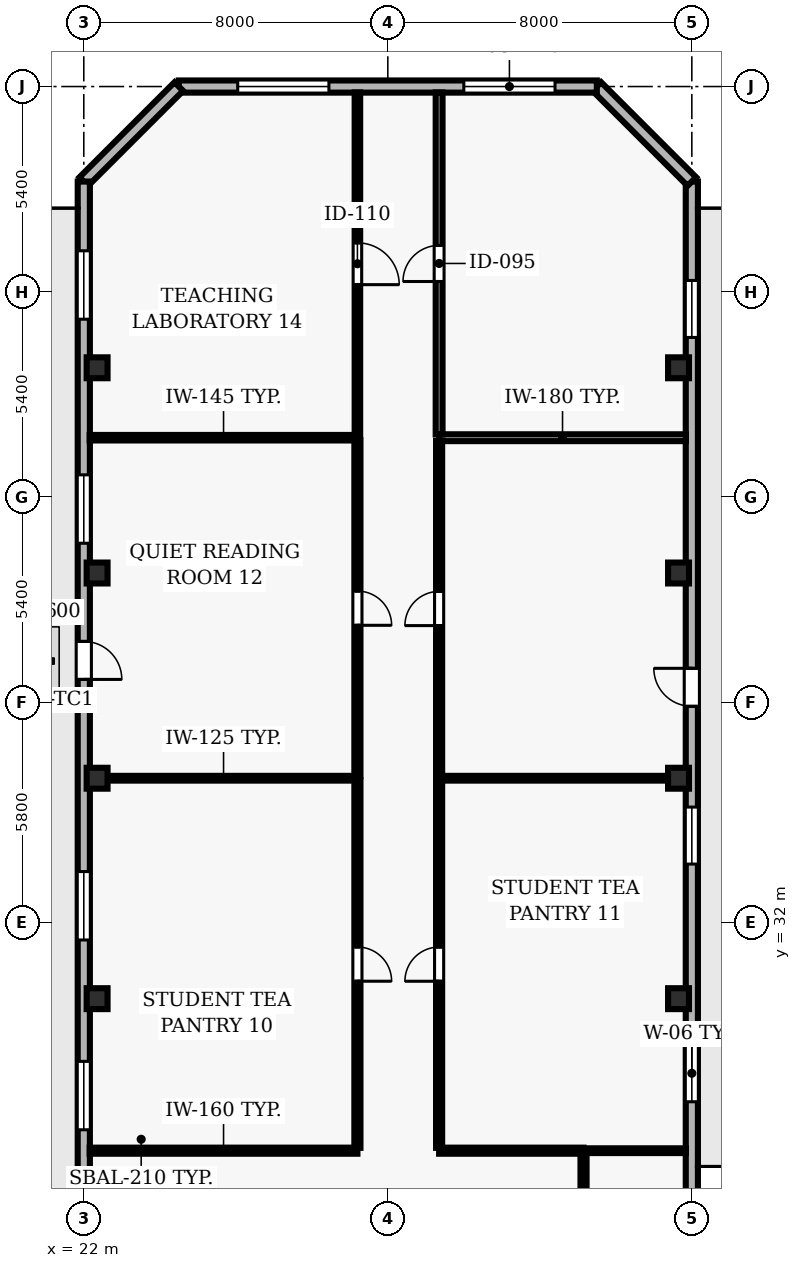
"""IFC4 building model, lengths in metres.
Left out: names, types, materials, properties, quantities, classifications, styles, units other than length and angle.
Written with IfcOpenShell. Run it as: python <this file> out.ifc"""

import sys

from ifc_helpers import new_model, si_unit, direction, frame, frame_2d, origin, origin_2d, place, context, subcontext, project, spatial, rectangle, hollow_rectangle, extrude, element, fill, save


model = new_model("IFC4")
c1 = context("Model", 3, precision=1e-05, world=origin(), true_north=direction((0.0, 1.0)))
c2 = subcontext(c1, "Body", "Model", "MODEL_VIEW")
j1 = project(units=[si_unit("LENGTHUNIT", "METRE"), si_unit("PLANEANGLEUNIT", "RADIAN")], contexts=[c1])
p1 = place(None, origin())
s1 = spatial("IfcSite", under=j1, at=p1, CompositionType="ELEMENT")
p2 = place(p1, origin())
s2 = spatial("IfcBuilding", under=s1, at=p2, CompositionType="ELEMENT")
p3 = place(p2, frame((0.0, 0.0, 89.5)))
s3 = spatial("IfcBuildingStorey", under=s2, at=p3, CompositionType="ELEMENT", Elevation=89.5)
for number, where, z_axis, x_axis in (
    (1, (22.35, 30.0, 0.0), (0.0, 0.0, 1.0), (1.0, 0.0, 0.0)),
    (2, (37.65, 30.0, 0.0), (0.0, 0.0, 1.0), (1.0, 0.0, 0.0)),
    (3, (22.35, 35.8, 0.0), (0.0, 0.0, 1.0), (1.0, 0.0, 0.0)),
    (4, (37.65, 35.8, 0.0), (0.0, 0.0, 1.0), (1.0, 0.0, 0.0)),
    (5, (22.35, 41.2, 0.0), (0.0, 0.0, 1.0), (1.0, 0.0, 0.0)),
    (6, (37.65, 41.2, 0.0), (0.0, 0.0, 1.0), (1.0, 0.0, 0.0)),
    (7, (22.35, 46.6, 0.0), (0.0, 0.0, 1.0), (1.0, 0.0, 0.0)),
    (8, (37.65, 46.6, 0.0), (0.0, 0.0, 1.0), (1.0, 0.0, 0.0)),
):
    element("IfcColumn", number, at=place(p3, frame(where, z_axis=z_axis, x_axis=x_axis)), inside=s3, PredefinedType="COLUMN", context=c2, shape_type="SweptSolid", body=[
        extrude(hollow_rectangle(XDim=0.55, YDim=0.55, WallThickness=0.025, at=origin_2d()), origin(), (0.0, 0.0, 1.0), 3.9),
    ])
p4 = place(p3, frame((38.0, 24.685, 0.0), z_axis=(0.0, 0.0, 1.0), x_axis=(0.0, 1.0, 0.0)))
e9 = element("IfcWall", 9, at=p4, inside=s3, PredefinedType="SOLIDWALL", context=c2, shape_type="SweptSolid", body=[
    extrude(rectangle(XDim=26.815, YDim=0.32, at=frame_2d((13.407, 0.0))), origin(), (0.0, 0.0, 1.0), 3.64),
])
p5 = place(p4, frame((13.007, 0.0, 0.0)))
e10 = element("IfcOpeningElement", 10, at=p5, cuts=e9, PredefinedType="OPENING", context=c2, shape_type="SweptSolid", body=[
    extrude(rectangle(XDim=1.0, YDim=2.2, at=frame_2d((0.5, 1.1))), frame((0.0, 0.17, 0.0), z_axis=(0.0, -1.0, 0.0), x_axis=(1.0, 0.0, 0.0)), (0.0, 0.0, 1.0), 0.34),
])
p6 = place(p4, frame((2.602, 0.0, 0.9)))
e11 = element("IfcOpeningElement", 11, at=p6, cuts=e9, PredefinedType="OPENING", context=c2, shape_type="SweptSolid", body=[
    extrude(rectangle(XDim=1.5, YDim=1.8, at=frame_2d((0.75, 0.9))), frame((0.0, 0.17, 0.0), z_axis=(0.0, -1.0, 0.0), x_axis=(1.0, 0.0, 0.0)), (0.0, 0.0, 1.0), 0.34),
])
p7 = place(p4, frame((8.856, 0.0, 0.9)))
e12 = element("IfcOpeningElement", 12, at=p7, cuts=e9, PredefinedType="OPENING", context=c2, shape_type="SweptSolid", body=[
    extrude(rectangle(XDim=1.5, YDim=1.8, at=frame_2d((0.75, 0.9))), frame((0.0, 0.17, 0.0), z_axis=(0.0, -1.0, 0.0), x_axis=(1.0, 0.0, 0.0)), (0.0, 0.0, 1.0), 0.34),
])
p8 = place(p4, frame((22.713, 0.0, 0.9)))
e13 = element("IfcOpeningElement", 13, at=p8, cuts=e9, PredefinedType="OPENING", context=c2, shape_type="SweptSolid", body=[
    extrude(rectangle(XDim=1.5, YDim=1.8, at=frame_2d((0.75, 0.9))), frame((0.0, 0.17, 0.0), z_axis=(0.0, -1.0, 0.0), x_axis=(1.0, 0.0, 0.0)), (0.0, 0.0, 1.0), 0.34),
])
p9 = place(p3, frame((38.0, 51.5, 0.0), z_axis=(0.0, 0.0, 1.0), x_axis=(-0.707106781187, 0.707106781187, 0.0)))
e14 = element("IfcWall", 14, at=p9, inside=s3, PredefinedType="SOLIDWALL", context=c2, shape_type="SweptSolid", body=[
    extrude(rectangle(XDim=3.536, YDim=0.32, at=frame_2d((1.768, 0.0))), origin(), (0.0, 0.0, 1.0), 3.64),
])
p10 = place(p3, frame((35.5, 54.0, 0.0), z_axis=(0.0, 0.0, 1.0), x_axis=(-1.0, 0.0, 0.0)))
e15 = element("IfcWall", 15, at=p10, inside=s3, PredefinedType="SOLIDWALL", context=c2, shape_type="SweptSolid", body=[
    extrude(rectangle(XDim=11.0, YDim=0.32, at=frame_2d((5.5, 0.0))), origin(), (0.0, 0.0, 1.0), 3.64),
])
p11 = place(p10, frame((1.1, 0.0, 0.9)))
e16 = element("IfcOpeningElement", 16, at=p11, cuts=e15, PredefinedType="OPENING", context=c2, shape_type="SweptSolid", body=[
    extrude(rectangle(XDim=2.4, YDim=1.8, at=frame_2d((1.2, 0.9))), frame((0.0, 0.17, 0.0), z_axis=(0.0, -1.0, 0.0), x_axis=(1.0, 0.0, 0.0)), (0.0, 0.0, 1.0), 0.34),
])
p12 = place(p10, frame((7.05, 0.0, 0.9)))
e17 = element("IfcOpeningElement", 17, at=p12, cuts=e15, PredefinedType="OPENING", context=c2, shape_type="SweptSolid", body=[
    extrude(rectangle(XDim=2.4, YDim=1.8, at=frame_2d((1.2, 0.9))), frame((0.0, 0.17, 0.0), z_axis=(0.0, -1.0, 0.0), x_axis=(1.0, 0.0, 0.0)), (0.0, 0.0, 1.0), 0.34),
])
p13 = place(p3, frame((24.5, 54.0, 0.0), z_axis=(0.0, 0.0, 1.0), x_axis=(-0.707106781187, -0.707106781187, 0.0)))
e18 = element("IfcWall", 18, at=p13, inside=s3, PredefinedType="SOLIDWALL", context=c2, shape_type="SweptSolid", body=[
    extrude(rectangle(XDim=3.536, YDim=0.32, at=frame_2d((1.768, 0.0))), origin(), (0.0, 0.0, 1.0), 3.64),
])
p14 = place(p3, frame((22.0, 51.5, 0.0), z_axis=(0.0, 0.0, 1.0), x_axis=(0.0, -1.0, 0.0)))
e19 = element("IfcWall", 19, at=p14, inside=s3, PredefinedType="SOLIDWALL", context=c2, shape_type="SweptSolid", body=[
    extrude(rectangle(XDim=49.0, YDim=0.32, at=frame_2d((24.5, 0.0))), origin(), (0.0, 0.0, 1.0), 3.64),
])
p15 = place(p14, frame((12.1, 0.0, 0.0)))
e20 = element("IfcOpeningElement", 20, at=p15, cuts=e19, PredefinedType="OPENING", context=c2, shape_type="SweptSolid", body=[
    extrude(rectangle(XDim=1.0, YDim=2.2, at=frame_2d((0.5, 1.1))), frame((0.0, 0.17, 0.0), z_axis=(0.0, -1.0, 0.0), x_axis=(1.0, 0.0, 0.0)), (0.0, 0.0, 1.0), 0.34),
])
p16 = place(p14, frame((1.822, 0.0, 0.9)))
e21 = element("IfcOpeningElement", 21, at=p16, cuts=e19, PredefinedType="OPENING", context=c2, shape_type="SweptSolid", body=[
    extrude(rectangle(XDim=1.8, YDim=2.2, at=frame_2d((0.9, 1.1))), frame((0.0, 0.17, 0.0), z_axis=(0.0, -1.0, 0.0), x_axis=(1.0, 0.0, 0.0)), (0.0, 0.0, 1.0), 0.34),
])
p17 = place(p14, frame((7.717, 0.0, 0.9)))
e22 = element("IfcOpeningElement", 22, at=p17, cuts=e19, PredefinedType="OPENING", context=c2, shape_type="SweptSolid", body=[
    extrude(rectangle(XDim=1.8, YDim=2.2, at=frame_2d((0.9, 1.1))), frame((0.0, 0.17, 0.0), z_axis=(0.0, -1.0, 0.0), x_axis=(1.0, 0.0, 0.0)), (0.0, 0.0, 1.0), 0.34),
])
p18 = place(p14, frame((18.156, 0.0, 0.9)))
e23 = element("IfcOpeningElement", 23, at=p18, cuts=e19, PredefinedType="OPENING", context=c2, shape_type="SweptSolid", body=[
    extrude(rectangle(XDim=1.8, YDim=2.2, at=frame_2d((0.9, 1.1))), frame((0.0, 0.17, 0.0), z_axis=(0.0, -1.0, 0.0), x_axis=(1.0, 0.0, 0.0)), (0.0, 0.0, 1.0), 0.34),
])
p19 = place(p14, frame((23.15, 0.0, 0.9)))
e24 = element("IfcOpeningElement", 24, at=p19, cuts=e19, PredefinedType="OPENING", context=c2, shape_type="SweptSolid", body=[
    extrude(rectangle(XDim=1.8, YDim=2.2, at=frame_2d((0.9, 1.1))), frame((0.0, 0.17, 0.0), z_axis=(0.0, -1.0, 0.0), x_axis=(1.0, 0.0, 0.0)), (0.0, 0.0, 1.0), 0.34),
])
p20 = place(p14, frame((29.044, 0.0, 0.9)))
e25 = element("IfcOpeningElement", 25, at=p20, cuts=e19, PredefinedType="OPENING", context=c2, shape_type="SweptSolid", body=[
    extrude(rectangle(XDim=1.8, YDim=2.2, at=frame_2d((0.9, 1.1))), frame((0.0, 0.17, 0.0), z_axis=(0.0, -1.0, 0.0), x_axis=(1.0, 0.0, 0.0)), (0.0, 0.0, 1.0), 0.34),
])
p21 = place(p14, frame((34.039, 0.0, 0.9)))
e26 = element("IfcOpeningElement", 26, at=p21, cuts=e19, PredefinedType="OPENING", context=c2, shape_type="SweptSolid", body=[
    extrude(rectangle(XDim=1.8, YDim=2.2, at=frame_2d((0.9, 1.1))), frame((0.0, 0.17, 0.0), z_axis=(0.0, -1.0, 0.0), x_axis=(1.0, 0.0, 0.0)), (0.0, 0.0, 1.0), 0.34),
])
p22 = place(p14, frame((39.933, 0.0, 0.9)))
e27 = element("IfcOpeningElement", 27, at=p22, cuts=e19, PredefinedType="OPENING", context=c2, shape_type="SweptSolid", body=[
    extrude(rectangle(XDim=1.8, YDim=2.2, at=frame_2d((0.9, 1.1))), frame((0.0, 0.17, 0.0), z_axis=(0.0, -1.0, 0.0), x_axis=(1.0, 0.0, 0.0)), (0.0, 0.0, 1.0), 0.34),
])
p23 = place(p3, frame((29.2, 26.0, 0.0), z_axis=(0.0, 0.0, 1.0), x_axis=(-1.0, 0.0, 0.0)))
e28 = element("IfcWall", 28, at=p23, inside=s3, PredefinedType="PARTITIONING", context=c2, shape_type="SweptSolid", body=[
    extrude(rectangle(XDim=7.045, YDim=0.16, at=frame_2d((3.522, 0.0))), origin(), (0.0, 0.0, 1.0), 3.64),
])
p24 = place(p3, frame((29.2, 35.8, 0.0), z_axis=(0.0, 0.0, 1.0), x_axis=(-1.0, 0.0, 0.0)))
e29 = element("IfcWall", 29, at=p24, inside=s3, PredefinedType="PARTITIONING", context=c2, shape_type="SweptSolid", body=[
    extrude(rectangle(XDim=7.045, YDim=0.125, at=frame_2d((3.522, 0.0))), origin(), (0.0, 0.0, 1.0), 3.005),
])
p25 = place(p3, frame((29.2, 44.76, 0.0), z_axis=(0.0, 0.0, 1.0), x_axis=(-1.0, 0.0, 0.0)))
e30 = element("IfcWall", 30, at=p25, inside=s3, PredefinedType="PARTITIONING", context=c2, shape_type="SweptSolid", body=[
    extrude(rectangle(XDim=7.045, YDim=0.145, at=frame_2d((3.522, 0.0))), origin(), (0.0, 0.0, 1.0), 3.64),
])
p26 = place(p3, frame((35.15, 26.0, 0.0), z_axis=(0.0, 0.0, 1.0), x_axis=(-1.0, 0.0, 0.0)))
e31 = element("IfcWall", 31, at=p26, inside=s3, PredefinedType="PARTITIONING", context=c2, shape_type="SweptSolid", body=[
    extrude(rectangle(XDim=3.8, YDim=0.16, at=frame_2d((1.9, 0.0))), origin(), (0.0, 0.0, 1.0), 3.64),
])
p27 = place(p3, frame((35.15, 26.0, 0.0), z_axis=(0.0, 0.0, 1.0), x_axis=(1.0, 0.0, 0.0)))
e32 = element("IfcWall", 32, at=p27, inside=s3, PredefinedType="PARTITIONING", context=c2, shape_type="SweptSolid", body=[
    extrude(rectangle(XDim=2.695, YDim=0.125, at=frame_2d((1.348, 0.0))), origin(), (0.0, 0.0, 1.0), 3.64),
])
p28 = place(p3, frame((37.845, 35.8, 0.0), z_axis=(0.0, 0.0, 1.0), x_axis=(-1.0, 0.0, 0.0)))
e33 = element("IfcWall", 33, at=p28, inside=s3, PredefinedType="PARTITIONING", context=c2, shape_type="SweptSolid", body=[
    extrude(rectangle(XDim=6.495, YDim=0.125, at=frame_2d((3.248, 0.0))), origin(), (0.0, 0.0, 1.0), 3.005),
])
p29 = place(p3, frame((37.845, 44.76, 0.0), z_axis=(0.0, 0.0, 1.0), x_axis=(-1.0, 0.0, 0.0)))
e34 = element("IfcWall", 34, at=p29, inside=s3, PredefinedType="PARTITIONING", context=c2, shape_type="SweptSolid", body=[
    extrude(rectangle(XDim=6.495, YDim=0.18, at=frame_2d((3.248, 0.0))), origin(), (0.0, 0.0, 1.0), 3.64),
])
p30 = place(p3, frame((29.2, 35.742, 0.0), z_axis=(0.0, 0.0, 1.0), x_axis=(0.0, -1.0, 0.0)))
e35 = element("IfcWall", 35, at=p30, inside=s3, PredefinedType="PARTITIONING", context=c2, shape_type="SweptSolid", body=[
    extrude(rectangle(XDim=9.667, YDim=0.16, at=frame_2d((4.833, 0.0))), origin(), (0.0, 0.0, 1.0), 3.64),
])
p31 = place(p30, frame((4.383, 0.0, 0.0)))
e36 = element("IfcOpeningElement", 36, at=p31, cuts=e35, PredefinedType="OPENING", context=c2, shape_type="SweptSolid", body=[
    extrude(rectangle(XDim=0.9, YDim=2.1, at=frame_2d((0.45, 1.05))), frame((0.0, 0.09, 0.0), z_axis=(0.0, -1.0, 0.0), x_axis=(1.0, 0.0, 0.0)), (0.0, 0.0, 1.0), 0.18),
])
p32 = place(p3, frame((29.2, 44.692, 0.0), z_axis=(0.0, 0.0, 1.0), x_axis=(0.0, -1.0, 0.0)))
e37 = element("IfcWall", 37, at=p32, inside=s3, PredefinedType="PARTITIONING", context=c2, shape_type="SweptSolid", body=[
    extrude(rectangle(XDim=8.835, YDim=0.16, at=frame_2d((4.417, 0.0))), origin(), (0.0, 0.0, 1.0), 3.64),
])
p33 = place(p32, frame((3.968, 0.0, 0.0)))
e38 = element("IfcOpeningElement", 38, at=p33, cuts=e37, PredefinedType="OPENING", context=c2, shape_type="SweptSolid", body=[
    extrude(rectangle(XDim=0.9, YDim=2.1, at=frame_2d((0.45, 1.05))), frame((0.0, 0.09, 0.0), z_axis=(0.0, -1.0, 0.0), x_axis=(1.0, 0.0, 0.0)), (0.0, 0.0, 1.0), 0.18),
])
p34 = place(p3, frame((29.2, 53.845, 0.0), z_axis=(0.0, 0.0, 1.0), x_axis=(0.0, -1.0, 0.0)))
e39 = element("IfcWall", 39, at=p34, inside=s3, PredefinedType="PARTITIONING", context=c2, shape_type="SweptSolid", body=[
    extrude(rectangle(XDim=9.017, YDim=0.145, at=frame_2d((4.509, 0.0))), origin(), (0.0, 0.0, 1.0), 3.64),
])
p35 = place(p34, frame((3.958, 0.0, 0.0)))
e40 = element("IfcOpeningElement", 40, at=p35, cuts=e39, PredefinedType="OPENING", context=c2, shape_type="SweptSolid", body=[
    extrude(rectangle(XDim=1.1, YDim=2.15, at=frame_2d((0.55, 1.075))), frame((0.0, 0.083, 0.0), z_axis=(0.0, -1.0, 0.0), x_axis=(1.0, 0.0, 0.0)), (0.0, 0.0, 1.0), 0.165),
])
p36 = place(p3, frame((31.35, 26.075, 0.0), z_axis=(0.0, 0.0, 1.0), x_axis=(0.0, 1.0, 0.0)))
e41 = element("IfcWall", 41, at=p36, inside=s3, PredefinedType="PARTITIONING", context=c2, shape_type="SweptSolid", body=[
    extrude(rectangle(XDim=9.667, YDim=0.16, at=frame_2d((4.833, 0.0))), origin(), (0.0, 0.0, 1.0), 3.64),
])
p37 = place(p36, frame((4.383, 0.0, 0.0)))
e42 = element("IfcOpeningElement", 42, at=p37, cuts=e41, PredefinedType="OPENING", context=c2, shape_type="SweptSolid", body=[
    extrude(rectangle(XDim=0.9, YDim=2.1, at=frame_2d((0.45, 1.05))), frame((0.0, 0.09, 0.0), z_axis=(0.0, -1.0, 0.0), x_axis=(1.0, 0.0, 0.0)), (0.0, 0.0, 1.0), 0.18),
])
p38 = place(p3, frame((31.35, 35.857, 0.0), z_axis=(0.0, 0.0, 1.0), x_axis=(0.0, 1.0, 0.0)))
e43 = element("IfcWall", 43, at=p38, inside=s3, PredefinedType="PARTITIONING", context=c2, shape_type="SweptSolid", body=[
    extrude(rectangle(XDim=8.818, YDim=0.16, at=frame_2d((4.409, 0.0))), origin(), (0.0, 0.0, 1.0), 3.64),
])
p39 = place(p38, frame((3.959, 0.0, 0.0)))
e44 = element("IfcOpeningElement", 44, at=p39, cuts=e43, PredefinedType="OPENING", context=c2, shape_type="SweptSolid", body=[
    extrude(rectangle(XDim=0.9, YDim=2.1, at=frame_2d((0.45, 1.05))), frame((0.0, 0.09, 0.0), z_axis=(0.0, -1.0, 0.0), x_axis=(1.0, 0.0, 0.0)), (0.0, 0.0, 1.0), 0.18),
])
p40 = place(p3, frame((31.35, 44.845, 0.0), z_axis=(0.0, 0.0, 1.0), x_axis=(0.0, 1.0, 0.0)))
e45 = element("IfcWall", 45, at=p40, inside=s3, PredefinedType="PARTITIONING", context=c2, shape_type="SweptSolid", body=[
    extrude(rectangle(XDim=9.0, YDim=0.18, at=frame_2d((4.5, 0.0))), origin(), (0.0, 0.0, 1.0), 3.64),
])
p41 = place(p40, frame((4.025, 0.0, 0.0)))
e46 = element("IfcOpeningElement", 46, at=p41, cuts=e45, PredefinedType="OPENING", context=c2, shape_type="SweptSolid", body=[
    extrude(rectangle(XDim=0.95, YDim=2.1, at=frame_2d((0.475, 1.05))), frame((0.0, 0.1, 0.0), z_axis=(0.0, -1.0, 0.0), x_axis=(1.0, 0.0, 0.0)), (0.0, 0.0, 1.0), 0.2),
])
p42 = place(p3, frame((35.15, 24.07, 0.0), z_axis=(0.0, 0.0, 1.0), x_axis=(0.0, 1.0, 0.0)))
e47 = element("IfcWall", 47, at=p42, inside=s3, PredefinedType="PARTITIONING", context=c2, shape_type="SweptSolid", body=[
    extrude(rectangle(XDim=1.855, YDim=0.16, at=frame_2d((0.927, 0.0))), origin(), (0.0, 0.0, 1.0), 3.64),
])
p43 = place(p5, origin())
e48 = element("IfcDoor", 48, at=p43, inside=s3, OperationType="SINGLE_SWING_RIGHT", PredefinedType="DOOR", context=c2, shape_type="SweptSolid", body=[
    extrude(rectangle(XDim=1.0, YDim=2.2, at=frame_2d((0.5, 1.1))), frame((0.0, 0.025, 0.0), z_axis=(0.0, -1.0, 0.0), x_axis=(1.0, 0.0, 0.0)), (0.0, 0.0, 1.0), 0.05),
])
fill(e10, e48)
p44 = place(p6, origin())
e49 = element("IfcWindow", 49, at=p44, inside=s3, PartitioningType="SINGLE_PANEL", PredefinedType="WINDOW", context=c2, shape_type="SweptSolid", body=[
    extrude(rectangle(XDim=1.5, YDim=1.8, at=frame_2d((0.75, 0.9))), frame((0.0, 0.03, 0.0), z_axis=(0.0, -1.0, 0.0), x_axis=(1.0, 0.0, 0.0)), (0.0, 0.0, 1.0), 0.06),
])
fill(e11, e49)
p45 = place(p7, origin())
e50 = element("IfcWindow", 50, at=p45, inside=s3, PartitioningType="SINGLE_PANEL", PredefinedType="WINDOW", context=c2, shape_type="SweptSolid", body=[
    extrude(rectangle(XDim=1.5, YDim=1.8, at=frame_2d((0.75, 0.9))), frame((0.0, 0.03, 0.0), z_axis=(0.0, -1.0, 0.0), x_axis=(1.0, 0.0, 0.0)), (0.0, 0.0, 1.0), 0.06),
])
fill(e12, e50)
p46 = place(p8, origin())
e51 = element("IfcWindow", 51, at=p46, inside=s3, PartitioningType="SINGLE_PANEL", PredefinedType="WINDOW", context=c2, shape_type="SweptSolid", body=[
    extrude(rectangle(XDim=1.5, YDim=1.8, at=frame_2d((0.75, 0.9))), frame((0.0, 0.03, 0.0), z_axis=(0.0, -1.0, 0.0), x_axis=(1.0, 0.0, 0.0)), (0.0, 0.0, 1.0), 0.06),
])
fill(e13, e51)
p47 = place(p11, origin())
e52 = element("IfcWindow", 52, at=p47, inside=s3, PartitioningType="SINGLE_PANEL", PredefinedType="WINDOW", context=c2, shape_type="SweptSolid", body=[
    extrude(rectangle(XDim=2.4, YDim=1.8, at=frame_2d((1.2, 0.9))), frame((0.0, 0.03, 0.0), z_axis=(0.0, -1.0, 0.0), x_axis=(1.0, 0.0, 0.0)), (0.0, 0.0, 1.0), 0.06),
])
fill(e16, e52)
p48 = place(p12, origin())
e53 = element("IfcWindow", 53, at=p48, inside=s3, PartitioningType="SINGLE_PANEL", PredefinedType="WINDOW", context=c2, shape_type="SweptSolid", body=[
    extrude(rectangle(XDim=2.4, YDim=1.8, at=frame_2d((1.2, 0.9))), frame((0.0, 0.03, 0.0), z_axis=(0.0, -1.0, 0.0), x_axis=(1.0, 0.0, 0.0)), (0.0, 0.0, 1.0), 0.06),
])
fill(e17, e53)
p49 = place(p15, origin())
e54 = element("IfcDoor", 54, at=p49, inside=s3, OperationType="SINGLE_SWING_RIGHT", PredefinedType="DOOR", context=c2, shape_type="SweptSolid", body=[
    extrude(rectangle(XDim=1.0, YDim=2.2, at=frame_2d((0.5, 1.1))), frame((0.0, 0.025, 0.0), z_axis=(0.0, -1.0, 0.0), x_axis=(1.0, 0.0, 0.0)), (0.0, 0.0, 1.0), 0.05),
])
fill(e20, e54)
p50 = place(p16, origin())
e55 = element("IfcWindow", 55, at=p50, inside=s3, PartitioningType="SINGLE_PANEL", PredefinedType="WINDOW", context=c2, shape_type="SweptSolid", body=[
    extrude(rectangle(XDim=1.8, YDim=2.2, at=frame_2d((0.9, 1.1))), frame((0.0, 0.03, 0.0), z_axis=(0.0, -1.0, 0.0), x_axis=(1.0, 0.0, 0.0)), (0.0, 0.0, 1.0), 0.06),
])
fill(e21, e55)
p51 = place(p17, origin())
e56 = element("IfcWindow", 56, at=p51, inside=s3, PartitioningType="SINGLE_PANEL", PredefinedType="WINDOW", context=c2, shape_type="SweptSolid", body=[
    extrude(rectangle(XDim=1.8, YDim=2.2, at=frame_2d((0.9, 1.1))), frame((0.0, 0.03, 0.0), z_axis=(0.0, -1.0, 0.0), x_axis=(1.0, 0.0, 0.0)), (0.0, 0.0, 1.0), 0.06),
])
fill(e22, e56)
p52 = place(p18, origin())
e57 = element("IfcWindow", 57, at=p52, inside=s3, PartitioningType="SINGLE_PANEL", PredefinedType="WINDOW", context=c2, shape_type="SweptSolid", body=[
    extrude(rectangle(XDim=1.8, YDim=2.2, at=frame_2d((0.9, 1.1))), frame((0.0, 0.03, 0.0), z_axis=(0.0, -1.0, 0.0), x_axis=(1.0, 0.0, 0.0)), (0.0, 0.0, 1.0), 0.06),
])
fill(e23, e57)
p53 = place(p19, origin())
e58 = element("IfcWindow", 58, at=p53, inside=s3, PartitioningType="SINGLE_PANEL", PredefinedType="WINDOW", context=c2, shape_type="SweptSolid", body=[
    extrude(rectangle(XDim=1.8, YDim=2.2, at=frame_2d((0.9, 1.1))), frame((0.0, 0.03, 0.0), z_axis=(0.0, -1.0, 0.0), x_axis=(1.0, 0.0, 0.0)), (0.0, 0.0, 1.0), 0.06),
])
fill(e24, e58)
p54 = place(p31, origin())
e59 = element("IfcDoor", 59, at=p54, inside=s3, OperationType="SINGLE_SWING_RIGHT", PredefinedType="DOOR", context=c2, shape_type="SweptSolid", body=[
    extrude(rectangle(XDim=0.9, YDim=2.1, at=frame_2d((0.45, 1.05))), frame((0.0, 0.025, 0.0), z_axis=(0.0, -1.0, 0.0), x_axis=(1.0, 0.0, 0.0)), (0.0, 0.0, 1.0), 0.05),
])
fill(e36, e59)
p55 = place(p37, origin())
e60 = element("IfcDoor", 60, at=p55, inside=s3, OperationType="SINGLE_SWING_LEFT", PredefinedType="DOOR", context=c2, shape_type="SweptSolid", body=[
    extrude(rectangle(XDim=0.9, YDim=2.1, at=frame_2d((0.45, 1.05))), frame((0.0, 0.025, 0.0), z_axis=(0.0, -1.0, 0.0), x_axis=(1.0, 0.0, 0.0)), (0.0, 0.0, 1.0), 0.05),
])
fill(e42, e60)
p56 = place(p33, origin())
e61 = element("IfcDoor", 61, at=p56, inside=s3, OperationType="SINGLE_SWING_RIGHT", PredefinedType="DOOR", context=c2, shape_type="SweptSolid", body=[
    extrude(rectangle(XDim=0.9, YDim=2.1, at=frame_2d((0.45, 1.05))), frame((0.0, 0.025, 0.0), z_axis=(0.0, -1.0, 0.0), x_axis=(1.0, 0.0, 0.0)), (0.0, 0.0, 1.0), 0.05),
])
fill(e38, e61)
p57 = place(p39, origin())
e62 = element("IfcDoor", 62, at=p57, inside=s3, OperationType="SINGLE_SWING_LEFT", PredefinedType="DOOR", context=c2, shape_type="SweptSolid", body=[
    extrude(rectangle(XDim=0.9, YDim=2.1, at=frame_2d((0.45, 1.05))), frame((0.0, 0.025, 0.0), z_axis=(0.0, -1.0, 0.0), x_axis=(1.0, 0.0, 0.0)), (0.0, 0.0, 1.0), 0.05),
])
fill(e44, e62)
p58 = place(p35, origin())
e63 = element("IfcDoor", 63, at=p58, inside=s3, OperationType="SINGLE_SWING_RIGHT", PredefinedType="DOOR", context=c2, shape_type="SweptSolid", body=[
    extrude(rectangle(XDim=1.1, YDim=2.15, at=frame_2d((0.55, 1.075))), frame((0.0, 0.025, 0.0), z_axis=(0.0, -1.0, 0.0), x_axis=(1.0, 0.0, 0.0)), (0.0, 0.0, 1.0), 0.05),
])
fill(e40, e63)
p59 = place(p41, origin())
e64 = element("IfcDoor", 64, at=p59, inside=s3, OperationType="SINGLE_SWING_LEFT", PredefinedType="DOOR", context=c2, shape_type="SweptSolid", body=[
    extrude(rectangle(XDim=0.95, YDim=2.1, at=frame_2d((0.475, 1.05))), frame((0.0, 0.025, 0.0), z_axis=(0.0, -1.0, 0.0), x_axis=(1.0, 0.0, 0.0)), (0.0, 0.0, 1.0), 0.05),
])
fill(e46, e64)
save(model, sys.argv[1])
